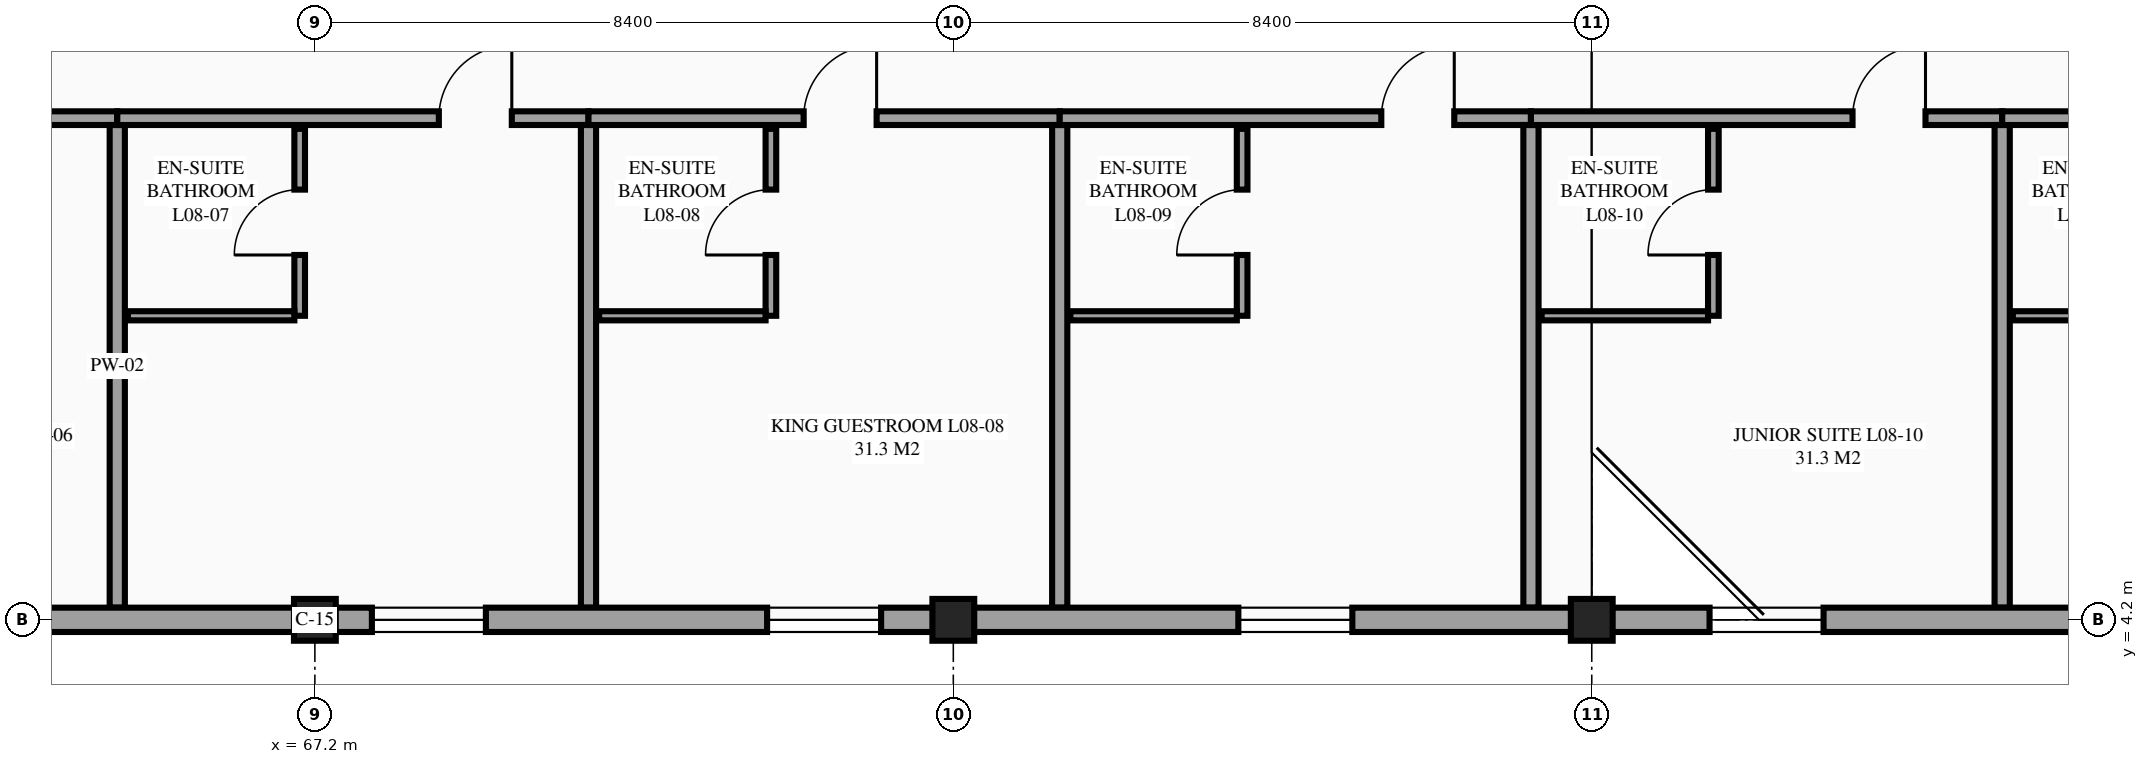
"""IFC4 building model, lengths in metres.
Left out: names, types, materials, properties, quantities, classifications, styles, units other than length and angle.
Written with IfcOpenShell. Run it as: python <this file> out.ifc"""

import sys

from ifc_helpers import new_model, si_unit, direction, frame, frame_2d, origin, origin_2d, place, context, subcontext, project, spatial, rectangle, extrude, element, fill, save


model = new_model("IFC4")
c1 = context("Model", 3, precision=1e-05, world=origin(), true_north=direction((0.0, 1.0)))
c2 = subcontext(c1, "Body", "Model", "MODEL_VIEW")
j1 = project(units=[si_unit("LENGTHUNIT", "METRE"), si_unit("PLANEANGLEUNIT", "RADIAN")], contexts=[c1])
p1 = place(None, origin())
s1 = spatial("IfcSite", under=j1, at=p1, CompositionType="ELEMENT")
p2 = place(p1, origin())
s2 = spatial("IfcBuilding", under=s1, at=p2, CompositionType="ELEMENT")
p3 = place(p2, frame((0.0, 0.0, 32.7)))
s3 = spatial("IfcBuildingStorey", under=s2, at=p3, CompositionType="ELEMENT", Elevation=32.7)
for number, where, z_axis, x_axis in (
    (1, (67.2, 4.2, 0.0), (0.0, 0.0, 1.0), (1.0, 0.0, 0.0)),
    (2, (75.6, 4.2, 0.0), (0.0, 0.0, 1.0), (1.0, 0.0, 0.0)),
    (3, (84.0, 4.2, 0.0), (0.0, 0.0, 1.0), (1.0, 0.0, 0.0)),
):
    element("IfcColumn", number, at=place(p3, frame(where, z_axis=z_axis, x_axis=x_axis)), inside=s3, PredefinedType="COLUMN", context=c2, shape_type="SweptSolid", body=[
        extrude(rectangle(XDim=0.55, YDim=0.55, at=origin_2d()), origin(), (0.0, 0.0, 1.0), 3.6),
    ])
p4 = place(p3, frame((58.4, 10.8, 0.0), z_axis=(0.0, 0.0, 1.0), x_axis=(1.0, 0.0, 0.0)))
e4 = element("IfcWall", 4, at=p4, inside=s3, PredefinedType="PARTITIONING", context=c2, shape_type="SweptSolid", body=[
    extrude(rectangle(XDim=6.2, YDim=0.18, at=frame_2d((3.1, 0.0))), origin(), (0.0, 0.0, 1.0), 3.375),
])
p5 = place(p4, frame((4.231, 0.0, 0.0)))
e5 = element("IfcOpeningElement", 5, at=p5, cuts=e4, PredefinedType="OPENING", context=c2, shape_type="SweptSolid", body=[
    extrude(rectangle(XDim=0.96, YDim=2.15, at=frame_2d((0.48, 1.075))), frame((0.0, 0.1, 0.0), z_axis=(0.0, -1.0, 0.0), x_axis=(1.0, 0.0, 0.0)), (0.0, 0.0, 1.0), 0.2),
])
p6 = place(p3, frame((64.6, 4.36, 0.0), z_axis=(0.0, 0.0, 1.0), x_axis=(0.0, 1.0, 0.0)))
e6 = element("IfcWall", 6, at=p6, inside=s3, PredefinedType="PARTITIONING", context=c2, shape_type="SweptSolid", body=[
    extrude(rectangle(XDim=6.35, YDim=0.2, at=frame_2d((3.175, 0.0))), origin(), (0.0, 0.0, 1.0), 3.375),
])
p7 = place(p3, frame((64.6, 10.8, 0.0), z_axis=(0.0, 0.0, 1.0), x_axis=(1.0, 0.0, 0.0)))
e7 = element("IfcWall", 7, at=p7, inside=s3, PredefinedType="PARTITIONING", context=c2, shape_type="SweptSolid", body=[
    extrude(rectangle(XDim=6.2, YDim=0.18, at=frame_2d((3.1, 0.0))), origin(), (0.0, 0.0, 1.0), 3.375),
])
p8 = place(p7, frame((4.231, 0.0, 0.0)))
e8 = element("IfcOpeningElement", 8, at=p8, cuts=e7, PredefinedType="OPENING", context=c2, shape_type="SweptSolid", body=[
    extrude(rectangle(XDim=0.96, YDim=2.15, at=frame_2d((0.48, 1.075))), frame((0.0, 0.1, 0.0), z_axis=(0.0, -1.0, 0.0), x_axis=(1.0, 0.0, 0.0)), (0.0, 0.0, 1.0), 0.2),
])
p9 = place(p3, frame((70.8, 4.36, 0.0), z_axis=(0.0, 0.0, 1.0), x_axis=(0.0, 1.0, 0.0)))
e9 = element("IfcWall", 9, at=p9, inside=s3, PredefinedType="PARTITIONING", context=c2, shape_type="SweptSolid", body=[
    extrude(rectangle(XDim=6.35, YDim=0.2, at=frame_2d((3.175, 0.0))), origin(), (0.0, 0.0, 1.0), 3.375),
])
p10 = place(p3, frame((67.0, 8.2, 0.0), z_axis=(0.0, 0.0, 1.0), x_axis=(0.0, 1.0, 0.0)))
e10 = element("IfcWall", 10, at=p10, inside=s3, PredefinedType="PARTITIONING", context=c2, shape_type="SweptSolid", body=[
    extrude(rectangle(XDim=2.46, YDim=0.14, at=frame_2d((1.23, 0.0))), origin(), (0.0, 0.0, 1.0), 2.78),
])
p11 = place(p10, frame((0.8, 0.0, 0.0)))
e11 = element("IfcOpeningElement", 11, at=p11, cuts=e10, PredefinedType="OPENING", context=c2, shape_type="SweptSolid", body=[
    extrude(rectangle(XDim=0.86, YDim=2.1, at=frame_2d((0.43, 1.05))), frame((0.0, 0.08, 0.0), z_axis=(0.0, -1.0, 0.0), x_axis=(1.0, 0.0, 0.0)), (0.0, 0.0, 1.0), 0.16),
])
p12 = place(p3, frame((64.74, 8.2, 0.0), z_axis=(0.0, 0.0, 1.0), x_axis=(1.0, 0.0, 0.0)))
e12 = element("IfcWall", 12, at=p12, inside=s3, PredefinedType="PARTITIONING", context=c2, shape_type="SweptSolid", body=[
    extrude(rectangle(XDim=2.19, YDim=0.12, at=frame_2d((1.095, 0.0))), origin(), (0.0, 0.0, 1.0), 3.375),
])
p13 = place(p3, frame((70.8, 10.8, 0.0), z_axis=(0.0, 0.0, 1.0), x_axis=(1.0, 0.0, 0.0)))
e13 = element("IfcWall", 13, at=p13, inside=s3, PredefinedType="PARTITIONING", context=c2, shape_type="SweptSolid", body=[
    extrude(rectangle(XDim=6.2, YDim=0.18, at=frame_2d((3.1, 0.0))), origin(), (0.0, 0.0, 1.0), 3.375),
])
p14 = place(p13, frame((2.831, 0.0, 0.0)))
e14 = element("IfcOpeningElement", 14, at=p14, cuts=e13, PredefinedType="OPENING", context=c2, shape_type="SweptSolid", body=[
    extrude(rectangle(XDim=0.96, YDim=2.15, at=frame_2d((0.48, 1.075))), frame((0.0, 0.1, 0.0), z_axis=(0.0, -1.0, 0.0), x_axis=(1.0, 0.0, 0.0)), (0.0, 0.0, 1.0), 0.2),
])
p15 = place(p3, frame((77.0, 4.36, 0.0), z_axis=(0.0, 0.0, 1.0), x_axis=(0.0, 1.0, 0.0)))
e15 = element("IfcWall", 15, at=p15, inside=s3, PredefinedType="PARTITIONING", context=c2, shape_type="SweptSolid", body=[
    extrude(rectangle(XDim=6.35, YDim=0.2, at=frame_2d((3.175, 0.0))), origin(), (0.0, 0.0, 1.0), 3.375),
])
p16 = place(p3, frame((73.2, 8.2, 0.0), z_axis=(0.0, 0.0, 1.0), x_axis=(0.0, 1.0, 0.0)))
e16 = element("IfcWall", 16, at=p16, inside=s3, PredefinedType="PARTITIONING", context=c2, shape_type="SweptSolid", body=[
    extrude(rectangle(XDim=2.46, YDim=0.14, at=frame_2d((1.23, 0.0))), origin(), (0.0, 0.0, 1.0), 3.375),
])
p17 = place(p16, frame((0.8, 0.0, 0.0)))
e17 = element("IfcOpeningElement", 17, at=p17, cuts=e16, PredefinedType="OPENING", context=c2, shape_type="SweptSolid", body=[
    extrude(rectangle(XDim=0.86, YDim=2.1, at=frame_2d((0.43, 1.05))), frame((0.0, 0.08, 0.0), z_axis=(0.0, -1.0, 0.0), x_axis=(1.0, 0.0, 0.0)), (0.0, 0.0, 1.0), 0.16),
])
p18 = place(p3, frame((70.94, 8.2, 0.0), z_axis=(0.0, 0.0, 1.0), x_axis=(1.0, 0.0, 0.0)))
e18 = element("IfcWall", 18, at=p18, inside=s3, PredefinedType="PARTITIONING", context=c2, shape_type="SweptSolid", body=[
    extrude(rectangle(XDim=2.19, YDim=0.12, at=frame_2d((1.095, 0.0))), origin(), (0.0, 0.0, 1.0), 3.375),
])
p19 = place(p3, frame((77.0, 10.8, 0.0), z_axis=(0.0, 0.0, 1.0), x_axis=(1.0, 0.0, 0.0)))
e19 = element("IfcWall", 19, at=p19, inside=s3, PredefinedType="PARTITIONING", context=c2, shape_type="SweptSolid", body=[
    extrude(rectangle(XDim=6.2, YDim=0.18, at=frame_2d((3.1, 0.0))), origin(), (0.0, 0.0, 1.0), 3.375),
])
p20 = place(p19, frame((4.231, 0.0, 0.0)))
e20 = element("IfcOpeningElement", 20, at=p20, cuts=e19, PredefinedType="OPENING", context=c2, shape_type="SweptSolid", body=[
    extrude(rectangle(XDim=0.96, YDim=2.15, at=frame_2d((0.48, 1.075))), frame((0.0, 0.1, 0.0), z_axis=(0.0, -1.0, 0.0), x_axis=(1.0, 0.0, 0.0)), (0.0, 0.0, 1.0), 0.2),
])
p21 = place(p3, frame((83.2, 4.36, 0.0), z_axis=(0.0, 0.0, 1.0), x_axis=(0.0, 1.0, 0.0)))
e21 = element("IfcWall", 21, at=p21, inside=s3, PredefinedType="PARTITIONING", context=c2, shape_type="SweptSolid", body=[
    extrude(rectangle(XDim=6.35, YDim=0.2, at=frame_2d((3.175, 0.0))), origin(), (0.0, 0.0, 1.0), 3.375),
])
p22 = place(p3, frame((79.4, 8.2, 0.0), z_axis=(0.0, 0.0, 1.0), x_axis=(0.0, 1.0, 0.0)))
e22 = element("IfcWall", 22, at=p22, inside=s3, PredefinedType="PARTITIONING", context=c2, shape_type="SweptSolid", body=[
    extrude(rectangle(XDim=2.46, YDim=0.14, at=frame_2d((1.23, 0.0))), origin(), (0.0, 0.0, 1.0), 3.375),
])
p23 = place(p22, frame((0.8, 0.0, 0.0)))
e23 = element("IfcOpeningElement", 23, at=p23, cuts=e22, PredefinedType="OPENING", context=c2, shape_type="SweptSolid", body=[
    extrude(rectangle(XDim=0.86, YDim=2.1, at=frame_2d((0.43, 1.05))), frame((0.0, 0.08, 0.0), z_axis=(0.0, -1.0, 0.0), x_axis=(1.0, 0.0, 0.0)), (0.0, 0.0, 1.0), 0.16),
])
p24 = place(p3, frame((77.14, 8.2, 0.0), z_axis=(0.0, 0.0, 1.0), x_axis=(1.0, 0.0, 0.0)))
e24 = element("IfcWall", 24, at=p24, inside=s3, PredefinedType="PARTITIONING", context=c2, shape_type="SweptSolid", body=[
    extrude(rectangle(XDim=2.19, YDim=0.12, at=frame_2d((1.095, 0.0))), origin(), (0.0, 0.0, 1.0), 3.375),
])
p25 = place(p3, frame((83.2, 10.8, 0.0), z_axis=(0.0, 0.0, 1.0), x_axis=(1.0, 0.0, 0.0)))
e25 = element("IfcWall", 25, at=p25, inside=s3, PredefinedType="PARTITIONING", context=c2, shape_type="SweptSolid", body=[
    extrude(rectangle(XDim=6.2, YDim=0.18, at=frame_2d((3.1, 0.0))), origin(), (0.0, 0.0, 1.0), 3.375),
])
p26 = place(p25, frame((4.231, 0.0, 0.0)))
e26 = element("IfcOpeningElement", 26, at=p26, cuts=e25, PredefinedType="OPENING", context=c2, shape_type="SweptSolid", body=[
    extrude(rectangle(XDim=0.96, YDim=2.15, at=frame_2d((0.48, 1.075))), frame((0.0, 0.1, 0.0), z_axis=(0.0, -1.0, 0.0), x_axis=(1.0, 0.0, 0.0)), (0.0, 0.0, 1.0), 0.2),
])
p27 = place(p3, frame((89.4, 4.36, 0.0), z_axis=(0.0, 0.0, 1.0), x_axis=(0.0, 1.0, 0.0)))
e27 = element("IfcWall", 27, at=p27, inside=s3, PredefinedType="PARTITIONING", context=c2, shape_type="SweptSolid", body=[
    extrude(rectangle(XDim=6.35, YDim=0.2, at=frame_2d((3.175, 0.0))), origin(), (0.0, 0.0, 1.0), 3.375),
])
p28 = place(p3, frame((85.6, 8.2, 0.0), z_axis=(0.0, 0.0, 1.0), x_axis=(0.0, 1.0, 0.0)))
e28 = element("IfcWall", 28, at=p28, inside=s3, PredefinedType="PARTITIONING", context=c2, shape_type="SweptSolid", body=[
    extrude(rectangle(XDim=2.46, YDim=0.14, at=frame_2d((1.23, 0.0))), origin(), (0.0, 0.0, 1.0), 3.375),
])
p29 = place(p28, frame((0.8, 0.0, 0.0)))
e29 = element("IfcOpeningElement", 29, at=p29, cuts=e28, PredefinedType="OPENING", context=c2, shape_type="SweptSolid", body=[
    extrude(rectangle(XDim=0.86, YDim=2.1, at=frame_2d((0.43, 1.05))), frame((0.0, 0.08, 0.0), z_axis=(0.0, -1.0, 0.0), x_axis=(1.0, 0.0, 0.0)), (0.0, 0.0, 1.0), 0.16),
])
p30 = place(p3, frame((83.34, 8.2, 0.0), z_axis=(0.0, 0.0, 1.0), x_axis=(1.0, 0.0, 0.0)))
e30 = element("IfcWall", 30, at=p30, inside=s3, PredefinedType="PARTITIONING", context=c2, shape_type="SweptSolid", body=[
    extrude(rectangle(XDim=2.19, YDim=0.12, at=frame_2d((1.095, 0.0))), origin(), (0.0, 0.0, 1.0), 3.375),
])
p31 = place(p3, frame((89.4, 10.8, 0.0), z_axis=(0.0, 0.0, 1.0), x_axis=(1.0, 0.0, 0.0)))
e31 = element("IfcWall", 31, at=p31, inside=s3, PredefinedType="PARTITIONING", context=c2, shape_type="SweptSolid", body=[
    extrude(rectangle(XDim=6.2, YDim=0.18, at=frame_2d((3.1, 0.0))), origin(), (0.0, 0.0, 1.0), 3.375),
])
p32 = place(p31, frame((4.581, 0.0, 0.0)))
e32 = element("IfcOpeningElement", 32, at=p32, cuts=e31, PredefinedType="OPENING", context=c2, shape_type="SweptSolid", body=[
    extrude(rectangle(XDim=0.96, YDim=2.15, at=frame_2d((0.48, 1.075))), frame((0.0, 0.1, 0.0), z_axis=(0.0, -1.0, 0.0), x_axis=(1.0, 0.0, 0.0)), (0.0, 0.0, 1.0), 0.2),
])
p33 = place(p3, frame((89.54, 8.2, 0.0), z_axis=(0.0, 0.0, 1.0), x_axis=(1.0, 0.0, 0.0)))
e33 = element("IfcWall", 33, at=p33, inside=s3, PredefinedType="PARTITIONING", context=c2, shape_type="SweptSolid", body=[
    extrude(rectangle(XDim=2.19, YDim=0.12, at=frame_2d((1.095, 0.0))), origin(), (0.0, 0.0, 1.0), 3.375),
])
p34 = place(p3, frame((58.8, 4.2, 0.0), z_axis=(0.0, 0.0, 1.0), x_axis=(1.0, 0.0, 0.0)))
e34 = element("IfcWall", 34, at=p34, inside=s3, PredefinedType="STANDARD", context=c2, shape_type="SweptSolid", body=[
    extrude(rectangle(XDim=8.4, YDim=0.32, at=frame_2d((4.2, 0.0))), origin(), (0.0, 0.0, 1.0), 2.43),
])
p35 = place(p34, frame((1.95, 0.0, 0.85)))
e35 = element("IfcOpeningElement", 35, at=p35, cuts=e34, PredefinedType="OPENING", context=c2, shape_type="SweptSolid", body=[
    extrude(rectangle(XDim=1.5, YDim=1.5, at=frame_2d((0.75, 0.75))), frame((0.0, 0.17, 0.0), z_axis=(0.0, -1.0, 0.0), x_axis=(1.0, 0.0, 0.0)), (0.0, 0.0, 1.0), 0.34),
])
p36 = place(p3, frame((67.2, 4.2, 0.0), z_axis=(0.0, 0.0, 1.0), x_axis=(1.0, 0.0, 0.0)))
e36 = element("IfcWall", 36, at=p36, inside=s3, PredefinedType="STANDARD", context=c2, shape_type="SweptSolid", body=[
    extrude(rectangle(XDim=8.4, YDim=0.32, at=frame_2d((4.2, 0.0))), origin(), (0.0, 0.0, 1.0), 3.07),
])
p37 = place(p36, frame((0.75, 0.0, 0.85)))
e37 = element("IfcOpeningElement", 37, at=p37, cuts=e36, PredefinedType="OPENING", context=c2, shape_type="SweptSolid", body=[
    extrude(rectangle(XDim=1.5, YDim=1.5, at=frame_2d((0.75, 0.75))), frame((0.0, 0.17, 0.0), z_axis=(0.0, -1.0, 0.0), x_axis=(1.0, 0.0, 0.0)), (0.0, 0.0, 1.0), 0.34),
])
p38 = place(p36, frame((5.95, 0.0, 0.85)))
e38 = element("IfcOpeningElement", 38, at=p38, cuts=e36, PredefinedType="OPENING", context=c2, shape_type="SweptSolid", body=[
    extrude(rectangle(XDim=1.5, YDim=1.5, at=frame_2d((0.75, 0.75))), frame((0.0, 0.17, 0.0), z_axis=(0.0, -1.0, 0.0), x_axis=(1.0, 0.0, 0.0)), (0.0, 0.0, 1.0), 0.34),
])
p39 = place(p3, frame((75.6, 4.2, 0.0), z_axis=(0.0, 0.0, 1.0), x_axis=(1.0, 0.0, 0.0)))
e39 = element("IfcWall", 39, at=p39, inside=s3, PredefinedType="STANDARD", context=c2, shape_type="SweptSolid", body=[
    extrude(rectangle(XDim=8.4, YDim=0.32, at=frame_2d((4.2, 0.0))), origin(), (0.0, 0.0, 1.0), 2.48),
])
p40 = place(p39, frame((3.75, 0.0, 0.85)))
e40 = element("IfcOpeningElement", 40, at=p40, cuts=e39, PredefinedType="OPENING", context=c2, shape_type="SweptSolid", body=[
    extrude(rectangle(XDim=1.5, YDim=1.5, at=frame_2d((0.75, 0.75))), frame((0.0, 0.17, 0.0), z_axis=(0.0, -1.0, 0.0), x_axis=(1.0, 0.0, 0.0)), (0.0, 0.0, 1.0), 0.34),
])
p41 = place(p3, frame((84.0, 4.2, 0.0), z_axis=(0.0, 0.0, 1.0), x_axis=(1.0, 0.0, 0.0)))
e41 = element("IfcWall", 41, at=p41, inside=s3, PredefinedType="STANDARD", context=c2, shape_type="SweptSolid", body=[
    extrude(rectangle(XDim=8.4, YDim=0.32, at=frame_2d((4.2, 0.0))), origin(), (0.0, 0.0, 1.0), 2.58),
])
p42 = place(p41, frame((1.55, 0.0, 0.85)))
e42 = element("IfcOpeningElement", 42, at=p42, cuts=e41, PredefinedType="OPENING", context=c2, shape_type="SweptSolid", body=[
    extrude(rectangle(XDim=1.5, YDim=1.5, at=frame_2d((0.75, 0.75))), frame((0.0, 0.17, 0.0), z_axis=(0.0, -1.0, 0.0), x_axis=(1.0, 0.0, 0.0)), (0.0, 0.0, 1.0), 0.34),
])
p43 = place(p37, origin())
e43 = element("IfcWindow", 43, at=p43, inside=s3, PartitioningType="SINGLE_PANEL", PredefinedType="WINDOW", context=c2, shape_type="SweptSolid", body=[
    extrude(rectangle(XDim=1.5, YDim=1.5, at=frame_2d((0.75, 0.75))), frame((0.0, 0.03, 0.0), z_axis=(0.0, -1.0, 0.0), x_axis=(1.0, 0.0, 0.0)), (0.0, 0.0, 1.0), 0.06),
])
fill(e37, e43)
p44 = place(p38, origin())
e44 = element("IfcWindow", 44, at=p44, inside=s3, PartitioningType="SINGLE_PANEL", PredefinedType="WINDOW", context=c2, shape_type="SweptSolid", body=[
    extrude(rectangle(XDim=1.5, YDim=1.5, at=frame_2d((0.75, 0.75))), frame((0.0, 0.03, 0.0), z_axis=(0.0, -1.0, 0.0), x_axis=(1.0, 0.0, 0.0)), (0.0, 0.0, 1.0), 0.06),
])
fill(e38, e44)
p45 = place(p40, origin())
e45 = element("IfcWindow", 45, at=p45, inside=s3, PartitioningType="SINGLE_PANEL", PredefinedType="WINDOW", context=c2, shape_type="SweptSolid", body=[
    extrude(rectangle(XDim=1.5, YDim=1.5, at=frame_2d((0.75, 0.75))), frame((0.0, 0.03, 0.0), z_axis=(0.0, -1.0, 0.0), x_axis=(1.0, 0.0, 0.0)), (0.0, 0.0, 1.0), 0.06),
])
fill(e40, e45)
p46 = place(p42, origin())
e46 = element("IfcWindow", 46, at=p46, inside=s3, PartitioningType="SINGLE_PANEL", PredefinedType="WINDOW", context=c2, shape_type="SweptSolid", body=[
    extrude(rectangle(XDim=1.5, YDim=1.5, at=frame_2d((0.75, 0.75))), frame((0.0, 0.03, 0.0), z_axis=(0.0, -1.0, 0.0), x_axis=(1.0, 0.0, 0.0)), (0.0, 0.0, 1.0), 0.06),
])
fill(e42, e46)
p47 = place(p8, origin())
e47 = element("IfcDoor", 47, at=p47, inside=s3, OperationType="SINGLE_SWING_RIGHT", PredefinedType="DOOR", context=c2, shape_type="SweptSolid", body=[
    extrude(rectangle(XDim=0.96, YDim=2.15, at=frame_2d((0.48, 1.075))), frame((0.0, 0.025, 0.0), z_axis=(0.0, -1.0, 0.0), x_axis=(1.0, 0.0, 0.0)), (0.0, 0.0, 1.0), 0.05),
])
fill(e8, e47)
p48 = place(p11, origin())
e48 = element("IfcDoor", 48, at=p48, inside=s3, OperationType="SINGLE_SWING_LEFT", PredefinedType="DOOR", context=c2, shape_type="SweptSolid", body=[
    extrude(rectangle(XDim=0.86, YDim=2.1, at=frame_2d((0.43, 1.05))), frame((0.0, 0.025, 0.0), z_axis=(0.0, -1.0, 0.0), x_axis=(1.0, 0.0, 0.0)), (0.0, 0.0, 1.0), 0.05),
])
fill(e11, e48)
p49 = place(p14, origin())
e49 = element("IfcDoor", 49, at=p49, inside=s3, OperationType="SINGLE_SWING_RIGHT", PredefinedType="DOOR", context=c2, shape_type="SweptSolid", body=[
    extrude(rectangle(XDim=0.96, YDim=2.15, at=frame_2d((0.48, 1.075))), frame((0.0, 0.025, 0.0), z_axis=(0.0, -1.0, 0.0), x_axis=(1.0, 0.0, 0.0)), (0.0, 0.0, 1.0), 0.05),
])
fill(e14, e49)
p50 = place(p17, origin())
e50 = element("IfcDoor", 50, at=p50, inside=s3, OperationType="SINGLE_SWING_LEFT", PredefinedType="DOOR", context=c2, shape_type="SweptSolid", body=[
    extrude(rectangle(XDim=0.86, YDim=2.1, at=frame_2d((0.43, 1.05))), frame((0.0, 0.025, 0.0), z_axis=(0.0, -1.0, 0.0), x_axis=(1.0, 0.0, 0.0)), (0.0, 0.0, 1.0), 0.05),
])
fill(e17, e50)
p51 = place(p20, origin())
e51 = element("IfcDoor", 51, at=p51, inside=s3, OperationType="SINGLE_SWING_RIGHT", PredefinedType="DOOR", context=c2, shape_type="SweptSolid", body=[
    extrude(rectangle(XDim=0.96, YDim=2.15, at=frame_2d((0.48, 1.075))), frame((0.0, 0.025, 0.0), z_axis=(0.0, -1.0, 0.0), x_axis=(1.0, 0.0, 0.0)), (0.0, 0.0, 1.0), 0.05),
])
fill(e20, e51)
p52 = place(p23, origin())
e52 = element("IfcDoor", 52, at=p52, inside=s3, OperationType="SINGLE_SWING_LEFT", PredefinedType="DOOR", context=c2, shape_type="SweptSolid", body=[
    extrude(rectangle(XDim=0.86, YDim=2.1, at=frame_2d((0.43, 1.05))), frame((0.0, 0.025, 0.0), z_axis=(0.0, -1.0, 0.0), x_axis=(1.0, 0.0, 0.0)), (0.0, 0.0, 1.0), 0.05),
])
fill(e23, e52)
p53 = place(p26, origin())
e53 = element("IfcDoor", 53, at=p53, inside=s3, OperationType="SINGLE_SWING_RIGHT", PredefinedType="DOOR", context=c2, shape_type="SweptSolid", body=[
    extrude(rectangle(XDim=0.96, YDim=2.15, at=frame_2d((0.48, 1.075))), frame((0.0, 0.025, 0.0), z_axis=(0.0, -1.0, 0.0), x_axis=(1.0, 0.0, 0.0)), (0.0, 0.0, 1.0), 0.05),
])
fill(e26, e53)
p54 = place(p29, origin())
e54 = element("IfcDoor", 54, at=p54, inside=s3, OperationType="SINGLE_SWING_LEFT", PredefinedType="DOOR", context=c2, shape_type="SweptSolid", body=[
    extrude(rectangle(XDim=0.86, YDim=2.1, at=frame_2d((0.43, 1.05))), frame((0.0, 0.025, 0.0), z_axis=(0.0, -1.0, 0.0), x_axis=(1.0, 0.0, 0.0)), (0.0, 0.0, 1.0), 0.05),
])
fill(e29, e54)
save(model, sys.argv[1])
